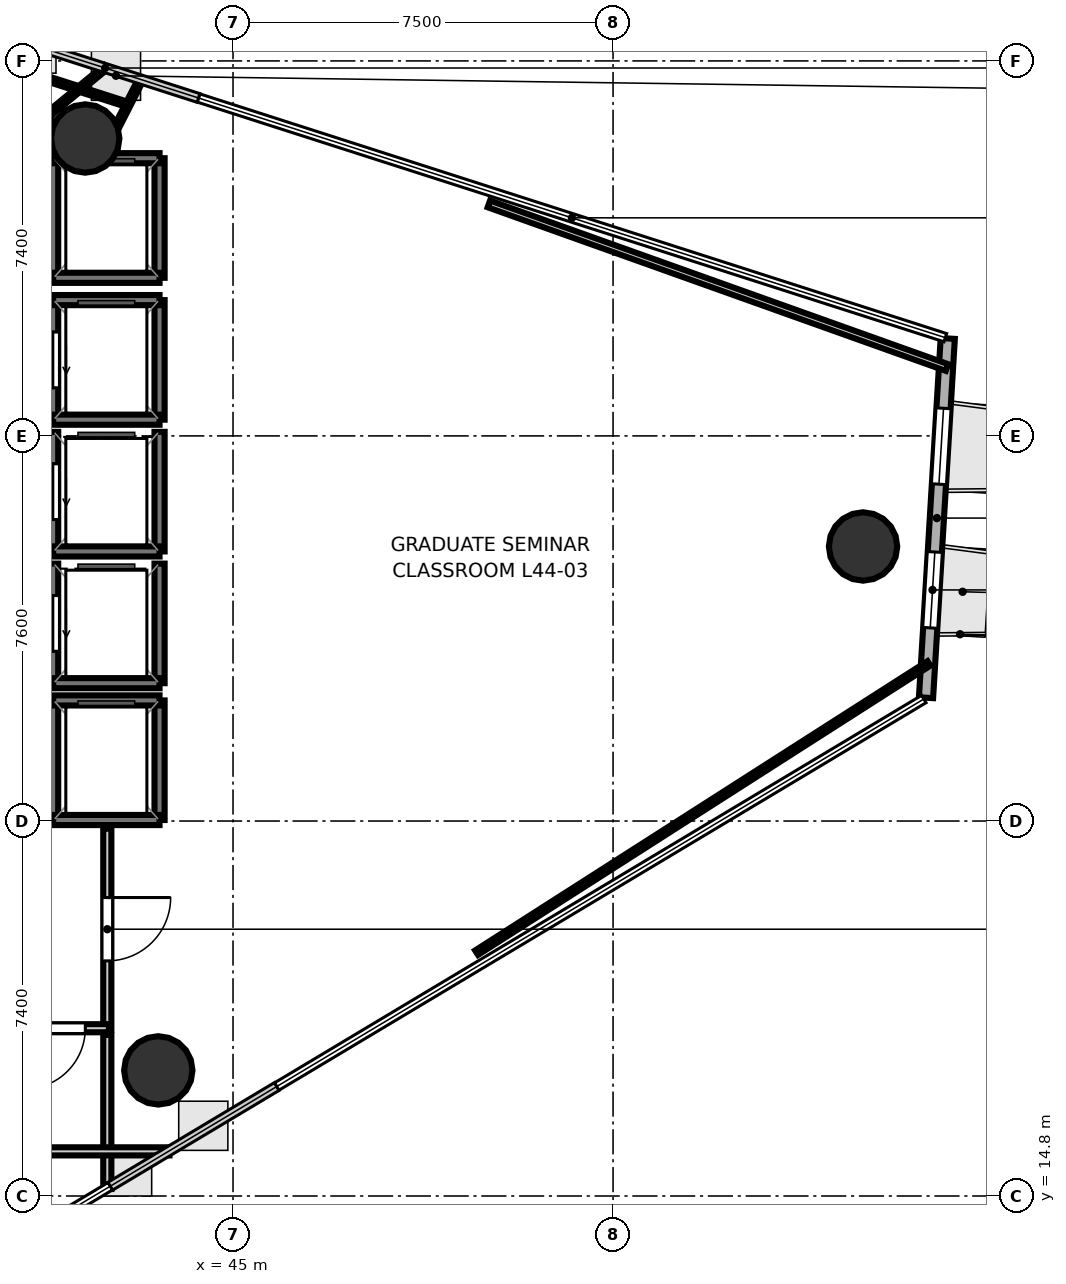
"""IFC4 building model, lengths in metres.
Left out: names, types, materials, properties, quantities, classifications, styles, units other than length and angle.
Written with IfcOpenShell. Run it as: python <this file> out.ifc"""

import sys

from ifc_helpers import new_model, si_unit, direction, frame, frame_2d, origin, origin_2d, place, context, subcontext, project, spatial, rectangle, hollow_circle, extrude, element, fill, save


model = new_model("IFC4")
c1 = context("Model", 3, precision=1e-05, world=origin(), true_north=direction((0.0, 1.0)))
c2 = subcontext(c1, "Body", "Model", "MODEL_VIEW")
j1 = project(units=[si_unit("LENGTHUNIT", "METRE"), si_unit("PLANEANGLEUNIT", "RADIAN")], contexts=[c1])
p1 = place(None, origin())
s1 = spatial("IfcSite", under=j1, at=p1, CompositionType="ELEMENT")
p2 = place(p1, origin())
s2 = spatial("IfcBuilding", under=s1, at=p2, CompositionType="ELEMENT")
p3 = place(p2, frame((0.0, 0.0, 173.5)))
s3 = spatial("IfcBuildingStorey", under=s2, at=p3, CompositionType="ELEMENT", Elevation=173.5)
for number, where, z_axis, x_axis in (
    (1, (57.434, 27.618, 0.0), (0.0, 0.0, 1.0), (1.0, 0.0, 0.0)),
    (2, (42.083, 35.669, 0.0), (0.0, 0.0, 1.0), (1.0, 0.0, 0.0)),
    (3, (43.525, 17.279, 0.0), (0.0, 0.0, 1.0), (1.0, 0.0, 0.0)),
):
    element("IfcColumn", number, at=place(p3, frame(where, z_axis=z_axis, x_axis=x_axis)), inside=s3, PredefinedType="COLUMN", context=c2, shape_type="SweptSolid", body=[
        extrude(hollow_circle(Radius=0.675, WallThickness=0.032, at=origin_2d()), origin(), (0.0, 0.0, 1.0), 3.7),
    ])
p4 = place(p3, frame((58.677, 24.633, 0.0), z_axis=(0.0, 0.0, 1.0), x_axis=(0.060426567169, 0.998172645378, 0.0)))
e4 = element("IfcWall", 4, at=p4, inside=s3, PredefinedType="SOLIDWALL", context=c2, shape_type="SweptSolid", body=[
    extrude(rectangle(XDim=7.103, YDim=0.28, at=frame_2d((3.551, 0.0))), origin(), (0.0, 0.0, 1.0), 3.52),
])
p5 = place(p4, frame((1.381, 0.0, 0.85)))
e5 = element("IfcOpeningElement", 5, at=p5, cuts=e4, PredefinedType="OPENING", context=c2, shape_type="SweptSolid", body=[
    extrude(rectangle(XDim=1.5, YDim=2.1, at=frame_2d((0.75, 1.05))), frame((0.0, 0.15, 0.0), z_axis=(0.0, -1.0, 0.0), x_axis=(1.0, 0.0, 0.0)), (0.0, 0.0, 1.0), 0.3),
])
p6 = place(p4, frame((4.222, 0.0, 0.85)))
e6 = element("IfcOpeningElement", 6, at=p6, cuts=e4, PredefinedType="OPENING", context=c2, shape_type="SweptSolid", body=[
    extrude(rectangle(XDim=1.5, YDim=2.1, at=frame_2d((0.75, 1.05))), frame((0.0, 0.15, 0.0), z_axis=(0.0, -1.0, 0.0), x_axis=(1.0, 0.0, 0.0)), (0.0, 0.0, 1.0), 0.3),
])
p7 = place(p3, frame((43.55, 30.12, 0.0), z_axis=(0.0, 0.0, 1.0), x_axis=(0.0, 1.0, 0.0)))
e7 = element("IfcWall", 7, at=p7, inside=s3, PredefinedType="SOLIDWALL", context=c2, shape_type="SweptSolid", body=[
    extrude(rectangle(XDim=2.36, YDim=0.2, at=frame_2d((1.18, 0.0))), origin(), (0.0, 0.0, 1.0), 3.52),
])
p8 = place(p3, frame((41.45, 30.12, 0.0), z_axis=(0.0, 0.0, 1.0), x_axis=(0.0, 1.0, 0.0)))
e8 = element("IfcWall", 8, at=p8, inside=s3, PredefinedType="SOLIDWALL", context=c2, shape_type="SweptSolid", body=[
    extrude(rectangle(XDim=2.36, YDim=0.2, at=frame_2d((1.18, 0.0))), origin(), (0.0, 0.0, 1.0), 3.52),
])
p9 = place(p8, frame((0.63, 0.0, 0.0)))
e9 = element("IfcOpeningElement", 9, at=p9, cuts=e8, PredefinedType="OPENING", context=c2, shape_type="SweptSolid", body=[
    extrude(rectangle(XDim=1.1, YDim=2.15, at=frame_2d((0.55, 1.075))), frame((0.0, 0.11, 0.0), z_axis=(0.0, -1.0, 0.0), x_axis=(1.0, 0.0, 0.0)), (0.0, 0.0, 1.0), 0.22),
])
for number, where, z_axis, x_axis in (
    (10, (41.45, 32.48, 0.0), (0.0, 0.0, 1.0), (1.0, 0.0, 0.0)),
    (11, (41.45, 30.12, 0.0), (0.0, 0.0, 1.0), (1.0, 0.0, 0.0)),
):
    element("IfcWall", number, at=place(p3, frame(where, z_axis=z_axis, x_axis=x_axis)), inside=s3, PredefinedType="SOLIDWALL", context=c2, shape_type="SweptSolid", body=[
        extrude(rectangle(XDim=2.1, YDim=0.2, at=frame_2d((1.05, 0.0))), origin(), (0.0, 0.0, 1.0), 3.52),
    ])
p10 = place(p3, frame((43.55, 27.52, 0.0), z_axis=(0.0, 0.0, 1.0), x_axis=(0.0, 1.0, 0.0)))
e12 = element("IfcWall", 12, at=p10, inside=s3, PredefinedType="SOLIDWALL", context=c2, shape_type="SweptSolid", body=[
    extrude(rectangle(XDim=2.36, YDim=0.2, at=frame_2d((1.18, 0.0))), origin(), (0.0, 0.0, 1.0), 3.52),
])
p11 = place(p3, frame((41.45, 27.52, 0.0), z_axis=(0.0, 0.0, 1.0), x_axis=(0.0, 1.0, 0.0)))
e13 = element("IfcWall", 13, at=p11, inside=s3, PredefinedType="SOLIDWALL", context=c2, shape_type="SweptSolid", body=[
    extrude(rectangle(XDim=2.36, YDim=0.2, at=frame_2d((1.18, 0.0))), origin(), (0.0, 0.0, 1.0), 3.52),
])
p12 = place(p11, frame((0.63, 0.0, 0.0)))
e14 = element("IfcOpeningElement", 14, at=p12, cuts=e13, PredefinedType="OPENING", context=c2, shape_type="SweptSolid", body=[
    extrude(rectangle(XDim=1.1, YDim=2.15, at=frame_2d((0.55, 1.075))), frame((0.0, 0.11, 0.0), z_axis=(0.0, -1.0, 0.0), x_axis=(1.0, 0.0, 0.0)), (0.0, 0.0, 1.0), 0.22),
])
p13 = place(p3, frame((41.45, 27.52, 0.0), z_axis=(0.0, 0.0, 1.0), x_axis=(1.0, 0.0, 0.0)))
e15 = element("IfcWall", 15, at=p13, inside=s3, PredefinedType="SOLIDWALL", context=c2, shape_type="SweptSolid", body=[
    extrude(rectangle(XDim=2.1, YDim=0.2, at=frame_2d((1.05, 0.0))), origin(), (0.0, 0.0, 1.0), 3.52),
])
p14 = place(p3, frame((43.55, 24.92, 0.0), z_axis=(0.0, 0.0, 1.0), x_axis=(0.0, 1.0, 0.0)))
e16 = element("IfcWall", 16, at=p14, inside=s3, PredefinedType="SOLIDWALL", context=c2, shape_type="SweptSolid", body=[
    extrude(rectangle(XDim=2.36, YDim=0.2, at=frame_2d((1.18, 0.0))), origin(), (0.0, 0.0, 1.0), 3.52),
])
p15 = place(p3, frame((41.45, 24.92, 0.0), z_axis=(0.0, 0.0, 1.0), x_axis=(0.0, 1.0, 0.0)))
e17 = element("IfcWall", 17, at=p15, inside=s3, PredefinedType="SOLIDWALL", context=c2, shape_type="SweptSolid", body=[
    extrude(rectangle(XDim=2.36, YDim=0.2, at=frame_2d((1.18, 0.0))), origin(), (0.0, 0.0, 1.0), 3.52),
])
p16 = place(p15, frame((0.63, 0.0, 0.0)))
e18 = element("IfcOpeningElement", 18, at=p16, cuts=e17, PredefinedType="OPENING", context=c2, shape_type="SweptSolid", body=[
    extrude(rectangle(XDim=1.1, YDim=2.15, at=frame_2d((0.55, 1.075))), frame((0.0, 0.11, 0.0), z_axis=(0.0, -1.0, 0.0), x_axis=(1.0, 0.0, 0.0)), (0.0, 0.0, 1.0), 0.22),
])
p17 = place(p3, frame((41.45, 24.92, 0.0), z_axis=(0.0, 0.0, 1.0), x_axis=(1.0, 0.0, 0.0)))
e19 = element("IfcWall", 19, at=p17, inside=s3, PredefinedType="SOLIDWALL", context=c2, shape_type="SweptSolid", body=[
    extrude(rectangle(XDim=2.1, YDim=0.2, at=frame_2d((1.05, 0.0))), origin(), (0.0, 0.0, 1.0), 3.52),
])
for number, where, z_axis, x_axis in (
    (20, (43.55, 22.22, 0.0), (0.0, 0.0, 1.0), (0.0, 1.0, 0.0)),
    (21, (41.45, 22.22, 0.0), (0.0, 0.0, 1.0), (0.0, 1.0, 0.0)),
):
    element("IfcWall", number, at=place(p3, frame(where, z_axis=z_axis, x_axis=x_axis)), inside=s3, PredefinedType="SOLIDWALL", context=c2, shape_type="SweptSolid", body=[
        extrude(rectangle(XDim=2.36, YDim=0.2, at=frame_2d((1.18, 0.0))), origin(), (0.0, 0.0, 1.0), 3.52),
    ])
for number, where, z_axis, x_axis in (
    (22, (41.45, 24.58, 0.0), (0.0, 0.0, 1.0), (1.0, 0.0, 0.0)),
    (23, (41.45, 22.22, 0.0), (0.0, 0.0, 1.0), (1.0, 0.0, 0.0)),
):
    element("IfcWall", number, at=place(p3, frame(where, z_axis=z_axis, x_axis=x_axis)), inside=s3, PredefinedType="SOLIDWALL", context=c2, shape_type="SweptSolid", body=[
        extrude(rectangle(XDim=2.1, YDim=0.2, at=frame_2d((1.05, 0.0))), origin(), (0.0, 0.0, 1.0), 3.52),
    ])
for number, where, z_axis, x_axis in (
    (24, (43.55, 32.92, 0.0), (0.0, 0.0, 1.0), (0.0, 1.0, 0.0)),
    (25, (41.45, 32.92, 0.0), (0.0, 0.0, 1.0), (0.0, 1.0, 0.0)),
):
    element("IfcWall", number, at=place(p3, frame(where, z_axis=z_axis, x_axis=x_axis)), inside=s3, PredefinedType="SOLIDWALL", context=c2, shape_type="SweptSolid", body=[
        extrude(rectangle(XDim=2.36, YDim=0.2, at=frame_2d((1.18, 0.0))), origin(), (0.0, 0.0, 1.0), 3.52),
    ])
for number, where, z_axis, x_axis in (
    (26, (41.45, 35.28, 0.0), (0.0, 0.0, 1.0), (1.0, 0.0, 0.0)),
    (27, (41.45, 32.92, 0.0), (0.0, 0.0, 1.0), (1.0, 0.0, 0.0)),
):
    element("IfcWall", number, at=place(p3, frame(where, z_axis=z_axis, x_axis=x_axis)), inside=s3, PredefinedType="SOLIDWALL", context=c2, shape_type="SweptSolid", body=[
        extrude(rectangle(XDim=2.1, YDim=0.2, at=frame_2d((1.05, 0.0))), origin(), (0.0, 0.0, 1.0), 3.52),
    ])
p18 = place(p3, frame((42.519, 22.05, 0.0), z_axis=(0.0, 0.0, 1.0), x_axis=(0.0, -1.0, 0.0)))
e28 = element("IfcWall", 28, at=p18, inside=s3, PredefinedType="PARTITIONING", context=c2, shape_type="SweptSolid", body=[
    extrude(rectangle(XDim=3.97, YDim=0.16, at=frame_2d((1.985, 0.0))), origin(), (0.0, 0.0, 1.0), 2.84),
])
p19 = place(p18, frame((1.36, 0.0, 0.0)))
e29 = element("IfcOpeningElement", 29, at=p19, cuts=e28, PredefinedType="OPENING", context=c2, shape_type="SweptSolid", body=[
    extrude(rectangle(XDim=1.25, YDim=2.2, at=frame_2d((0.625, 1.1))), frame((0.0, 0.09, 0.0), z_axis=(0.0, -1.0, 0.0), x_axis=(1.0, 0.0, 0.0)), (0.0, 0.0, 1.0), 0.18),
])
p20 = place(p3, frame((42.55, 18.111, 0.0), z_axis=(0.0, 0.0, 1.0), x_axis=(-1.0, 0.0, 0.0)))
e30 = element("IfcWall", 30, at=p20, inside=s3, PredefinedType="PARTITIONING", context=c2, shape_type="SweptSolid", body=[
    extrude(rectangle(XDim=2.13, YDim=0.16, at=frame_2d((1.065, 0.0))), origin(), (0.0, 0.0, 1.0), 2.84),
])
p21 = place(p20, frame((0.465, 0.0, 0.0)))
e31 = element("IfcOpeningElement", 31, at=p21, cuts=e30, PredefinedType="OPENING", context=c2, shape_type="SweptSolid", body=[
    extrude(rectangle(XDim=1.2, YDim=2.15, at=frame_2d((0.6, 1.075))), frame((0.0, 0.09, 0.0), z_axis=(0.0, -1.0, 0.0), x_axis=(1.0, 0.0, 0.0)), (0.0, 0.0, 1.0), 0.18),
])
p22 = place(p3, frame((42.519, 17.98, 0.0), z_axis=(0.0, 0.0, 1.0), x_axis=(0.0, -1.0, 0.0)))
e32 = element("IfcWall", 32, at=p22, inside=s3, PredefinedType="PARTITIONING", context=c2, shape_type="SweptSolid", body=[
    extrude(rectangle(XDim=3.042, YDim=0.16, at=frame_2d((1.521, 0.0))), origin(), (0.0, 0.0, 1.0), 2.84),
])
p23 = place(p3, frame((43.746, 15.681, 0.0), z_axis=(0.0, 0.0, 1.0), x_axis=(-1.0, 0.0, 0.0)))
e33 = element("IfcWall", 33, at=p23, inside=s3, PredefinedType="PARTITIONING", context=c2, shape_type="SweptSolid", body=[
    extrude(rectangle(XDim=15.346, YDim=0.16, at=frame_2d((7.673, 0.0))), origin(), (0.0, 0.0, 1.0), 2.84),
])
p24 = place(p23, frame((6.115, 0.0, 0.0)))
e34 = element("IfcOpeningElement", 34, at=p24, cuts=e33, PredefinedType="OPENING", context=c2, shape_type="SweptSolid", body=[
    extrude(rectangle(XDim=1.25, YDim=2.2, at=frame_2d((0.625, 1.1))), frame((0.0, 0.09, 0.0), z_axis=(0.0, -1.0, 0.0), x_axis=(1.0, 0.0, 0.0)), (0.0, 0.0, 1.0), 0.18),
])
p25 = place(p3, frame((42.462, 35.426, 0.0), z_axis=(0.0, 0.0, 1.0), x_axis=(0.454699955927, 0.890644682284, 0.0)))
e35 = element("IfcWall", 35, at=p25, inside=s3, PredefinedType="PARTITIONING", context=c2, shape_type="SweptSolid", body=[
    extrude(rectangle(XDim=1.601, YDim=0.105, at=frame_2d((0.801, 0.0))), origin(), (0.0, 0.0, 1.0), 2.84),
])
p26 = place(p3, frame((50.049, 34.378, 0.0), z_axis=(0.0, 0.0, 1.0), x_axis=(0.941766649099, -0.336267123944, 0.0)))
e36 = element("IfcWall", 36, at=p26, inside=s3, PredefinedType="PARTITIONING", context=c2, shape_type="SweptSolid", body=[
    extrude(rectangle(XDim=9.6, YDim=0.14, at=frame_2d((4.8, 0.0))), origin(), (0.0, 0.0, 1.0), 2.84),
])
p27 = place(p3, frame((58.734, 25.31, 0.0), z_axis=(0.0, 0.0, 1.0), x_axis=(-0.842503977738, -0.538690121958, 0.0)))
e37 = element("IfcWall", 37, at=p27, inside=s3, PredefinedType="PARTITIONING", context=c2, shape_type="SweptSolid", body=[
    extrude(rectangle(XDim=10.596, YDim=0.105, at=frame_2d((5.298, 0.0))), origin(), (0.0, 0.0, 1.0), 2.84),
])
p28 = place(p3, frame((37.22, 38.168, 0.0), z_axis=(0.0, 0.0, 1.0), x_axis=(0.952167427944, -0.305576813849, 0.0)))
e38 = element("IfcWall", 38, at=p28, inside=s3, PredefinedType="PARTITIONING", context=c2, shape_type="SweptSolid", body=[
    extrude(rectangle(XDim=5.904, YDim=0.105, at=frame_2d((2.952, 0.0))), origin(), (0.0, 0.0, 1.0), 2.84),
])
p29 = place(p3, frame((42.487, 37.074, 0.0), z_axis=(0.0, 0.0, 1.0), x_axis=(-0.773083984598, -0.634303675504, 0.0)))
e39 = element("IfcWall", 39, at=p29, inside=s3, PredefinedType="PARTITIONING", context=c2, shape_type="SweptSolid", body=[
    extrude(rectangle(XDim=1.446, YDim=0.105, at=frame_2d((0.723, 0.0))), origin(), (0.0, 0.0, 1.0), 2.84),
])
p30 = place(p9, origin())
e40 = element("IfcDoor", 40, at=p30, inside=s3, OperationType="SLIDING_TO_LEFT", PredefinedType="DOOR", context=c2, shape_type="SweptSolid", body=[
    extrude(rectangle(XDim=1.1, YDim=2.15, at=frame_2d((0.55, 1.075))), frame((0.0, 0.025, 0.0), z_axis=(0.0, -1.0, 0.0), x_axis=(1.0, 0.0, 0.0)), (0.0, 0.0, 1.0), 0.05),
])
fill(e9, e40)
p31 = place(p12, origin())
e41 = element("IfcDoor", 41, at=p31, inside=s3, OperationType="SLIDING_TO_LEFT", PredefinedType="DOOR", context=c2, shape_type="SweptSolid", body=[
    extrude(rectangle(XDim=1.1, YDim=2.15, at=frame_2d((0.55, 1.075))), frame((0.0, 0.025, 0.0), z_axis=(0.0, -1.0, 0.0), x_axis=(1.0, 0.0, 0.0)), (0.0, 0.0, 1.0), 0.05),
])
fill(e14, e41)
p32 = place(p16, origin())
e42 = element("IfcDoor", 42, at=p32, inside=s3, OperationType="SLIDING_TO_LEFT", PredefinedType="DOOR", context=c2, shape_type="SweptSolid", body=[
    extrude(rectangle(XDim=1.1, YDim=2.15, at=frame_2d((0.55, 1.075))), frame((0.0, 0.025, 0.0), z_axis=(0.0, -1.0, 0.0), x_axis=(1.0, 0.0, 0.0)), (0.0, 0.0, 1.0), 0.05),
])
fill(e18, e42)
p33 = place(p21, origin())
e43 = element("IfcDoor", 43, at=p33, inside=s3, OperationType="SINGLE_SWING_RIGHT", PredefinedType="DOOR", context=c2, shape_type="SweptSolid", body=[
    extrude(rectangle(XDim=1.2, YDim=2.15, at=frame_2d((0.6, 1.075))), frame((0.0, 0.025, 0.0), z_axis=(0.0, -1.0, 0.0), x_axis=(1.0, 0.0, 0.0)), (0.0, 0.0, 1.0), 0.05),
])
fill(e31, e43)
p34 = place(p19, origin())
e44 = element("IfcDoor", 44, at=p34, inside=s3, OperationType="SINGLE_SWING_LEFT", PredefinedType="DOOR", context=c2, shape_type="SweptSolid", body=[
    extrude(rectangle(XDim=1.25, YDim=2.2, at=frame_2d((0.625, 1.1))), frame((0.0, 0.025, 0.0), z_axis=(0.0, -1.0, 0.0), x_axis=(1.0, 0.0, 0.0)), (0.0, 0.0, 1.0), 0.05),
])
fill(e29, e44)
p35 = place(p5, origin())
e45 = element("IfcWindow", 45, at=p35, inside=s3, PartitioningType="SINGLE_PANEL", PredefinedType="WINDOW", context=c2, shape_type="SweptSolid", body=[
    extrude(rectangle(XDim=1.5, YDim=2.1, at=frame_2d((0.75, 1.05))), frame((0.0, 0.03, 0.0), z_axis=(0.0, -1.0, 0.0), x_axis=(1.0, 0.0, 0.0)), (0.0, 0.0, 1.0), 0.06),
])
fill(e5, e45)
p36 = place(p6, origin())
e46 = element("IfcWindow", 46, at=p36, inside=s3, PartitioningType="SINGLE_PANEL", PredefinedType="WINDOW", context=c2, shape_type="SweptSolid", body=[
    extrude(rectangle(XDim=1.5, YDim=2.1, at=frame_2d((0.75, 1.05))), frame((0.0, 0.03, 0.0), z_axis=(0.0, -1.0, 0.0), x_axis=(1.0, 0.0, 0.0)), (0.0, 0.0, 1.0), 0.06),
])
fill(e6, e46)
save(model, sys.argv[1])
